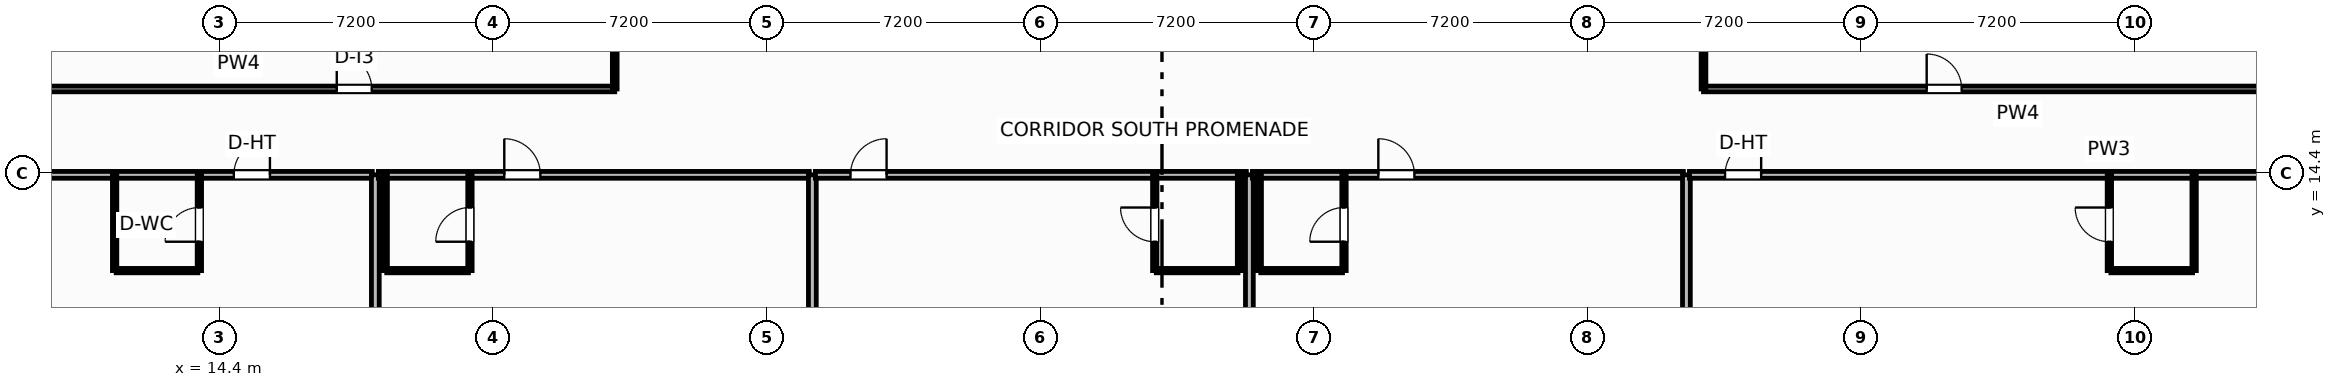
"""IFC4 building model, lengths in metres.
Left out: names, types, materials, properties, quantities, classifications, styles, units other than length and angle.
Written with IfcOpenShell. Run it as: python <this file> out.ifc"""

import sys

from ifc_helpers import new_model, si_unit, direction, frame, frame_2d, origin, place, context, subcontext, project, spatial, rectangle, extrude, element, fill, save


model = new_model("IFC4")
c1 = context("Model", 3, precision=1e-05, world=origin(), true_north=direction((0.0, 1.0)))
c2 = subcontext(c1, "Body", "Model", "MODEL_VIEW")
j1 = project(units=[si_unit("LENGTHUNIT", "METRE"), si_unit("PLANEANGLEUNIT", "RADIAN")], contexts=[c1])
p1 = place(None, origin())
s1 = spatial("IfcSite", under=j1, at=p1, CompositionType="ELEMENT")
p2 = place(p1, origin())
s2 = spatial("IfcBuilding", under=s1, at=p2, CompositionType="ELEMENT")
p3 = place(p2, frame((0.0, 0.0, 132.8)))
s3 = spatial("IfcBuildingStorey", under=s2, at=p3, CompositionType="ELEMENT", Elevation=132.8)
p4 = place(p3, frame((5.0, 16.61, 0.0), z_axis=(0.0, 0.0, 1.0), x_axis=(1.0, 0.0, 0.0)))
e1 = element("IfcWall", 1, at=p4, inside=s3, PredefinedType="PARTITIONING", context=c2, shape_type="SweptSolid", body=[
    extrude(rectangle(XDim=19.8, YDim=0.15, at=frame_2d((9.9, 0.0))), origin(), (0.0, 0.0, 1.0), 3.45),
])
p5 = place(p4, frame((12.485, 0.0, 0.0)))
e2 = element("IfcOpeningElement", 2, at=p5, cuts=e1, PredefinedType="OPENING", context=c2, shape_type="SweptSolid", body=[
    extrude(rectangle(XDim=0.92, YDim=2.05, at=frame_2d((0.46, 1.025))), frame((0.0, 0.085, 0.0), z_axis=(0.0, -1.0, 0.0), x_axis=(1.0, 0.0, 0.0)), (0.0, 0.0, 1.0), 0.17),
])
p6 = place(p3, frame((24.8, 16.61, 0.0), z_axis=(0.0, 0.0, 1.0), x_axis=(0.0, 1.0, 0.0)))
e3 = element("IfcWall", 3, at=p6, inside=s3, PredefinedType="PARTITIONING", context=c2, shape_type="SweptSolid", body=[
    extrude(rectangle(XDim=2.63, YDim=0.125, at=frame_2d((1.315, 0.0))), origin(), (0.0, 0.0, 1.0), 2.662),
])
p7 = place(p3, frame((53.45, 16.61, 0.0), z_axis=(0.0, 0.0, 1.0), x_axis=(1.0, 0.0, 0.0)))
e4 = element("IfcWall", 4, at=p7, inside=s3, PredefinedType="PARTITIONING", context=c2, shape_type="SweptSolid", body=[
    extrude(rectangle(XDim=16.55, YDim=0.15, at=frame_2d((8.275, 0.0))), origin(), (0.0, 0.0, 1.0), 3.45),
])
p8 = place(p7, frame((5.873, 0.0, 0.0)))
e5 = element("IfcOpeningElement", 5, at=p8, cuts=e4, PredefinedType="OPENING", context=c2, shape_type="SweptSolid", body=[
    extrude(rectangle(XDim=0.92, YDim=2.05, at=frame_2d((0.46, 1.025))), frame((0.0, 0.085, 0.0), z_axis=(0.0, -1.0, 0.0), x_axis=(1.0, 0.0, 0.0)), (0.0, 0.0, 1.0), 0.17),
])
p9 = place(p3, frame((53.45, 16.61, 0.0), z_axis=(0.0, 0.0, 1.0), x_axis=(0.0, 1.0, 0.0)))
e6 = element("IfcWall", 6, at=p9, inside=s3, PredefinedType="PARTITIONING", context=c2, shape_type="SweptSolid", body=[
    extrude(rectangle(XDim=2.63, YDim=0.125, at=frame_2d((1.315, 0.0))), origin(), (0.0, 0.0, 1.0), 3.45),
])
p10 = place(p3, frame((0.581, 14.35, 0.0), z_axis=(0.0, 0.0, 1.0), x_axis=(1.0, 0.0, 0.0)))
e7 = element("IfcWall", 7, at=p10, inside=s3, PredefinedType="PARTITIONING", context=c2, shape_type="SweptSolid", body=[
    extrude(rectangle(XDim=17.839, YDim=0.18, at=frame_2d((8.919, 0.0))), origin(), (0.0, 0.0, 1.0), 3.45),
])
p11 = place(p10, frame((14.196, 0.0, 0.0)))
e8 = element("IfcOpeningElement", 8, at=p11, cuts=e7, PredefinedType="OPENING", context=c2, shape_type="SweptSolid", body=[
    extrude(rectangle(XDim=0.95, YDim=2.15, at=frame_2d((0.475, 1.075))), frame((0.0, 0.1, 0.0), z_axis=(0.0, -1.0, 0.0), x_axis=(1.0, 0.0, 0.0)), (0.0, 0.0, 1.0), 0.2),
])
p12 = place(p3, frame((11.68, 11.83, 0.0), z_axis=(0.0, 0.0, 1.0), x_axis=(1.0, 0.0, 0.0)))
e9 = element("IfcWall", 9, at=p12, inside=s3, PredefinedType="PARTITIONING", context=c2, shape_type="SweptSolid", body=[
    extrude(rectangle(XDim=2.15, YDim=0.115, at=frame_2d((1.075, 0.0))), origin(), (0.0, 0.0, 1.0), 3.45),
])
p13 = place(p3, frame((13.87, 11.83, 0.0), z_axis=(0.0, 0.0, 1.0), x_axis=(0.0, 1.0, 0.0)))
e10 = element("IfcWall", 10, at=p13, inside=s3, PredefinedType="PARTITIONING", context=c2, shape_type="SweptSolid", body=[
    extrude(rectangle(XDim=2.52, YDim=0.115, at=frame_2d((1.26, 0.0))), origin(), (0.0, 0.0, 1.0), 3.45),
])
p14 = place(p13, frame((0.76, 0.0, 0.0)))
e11 = element("IfcOpeningElement", 11, at=p14, cuts=e10, PredefinedType="OPENING", context=c2, shape_type="SweptSolid", body=[
    extrude(rectangle(XDim=0.9, YDim=2.05, at=frame_2d((0.45, 1.025))), frame((0.0, 0.067, 0.0), z_axis=(0.0, -1.0, 0.0), x_axis=(1.0, 0.0, 0.0)), (0.0, 0.0, 1.0), 0.135),
])
p15 = place(p3, frame((11.64, 11.83, 0.0), z_axis=(0.0, 0.0, 1.0), x_axis=(0.0, 1.0, 0.0)))
e12 = element("IfcWall", 12, at=p15, inside=s3, PredefinedType="PARTITIONING", context=c2, shape_type="SweptSolid", body=[
    extrude(rectangle(XDim=2.52, YDim=0.115, at=frame_2d((1.26, 0.0))), origin(), (0.0, 0.0, 1.0), 3.45),
])
p16 = place(p3, frame((18.5, 4.379, 0.0), z_axis=(0.0, 0.0, 1.0), x_axis=(0.0, 1.0, 0.0)))
e13 = element("IfcWall", 13, at=p16, inside=s3, PredefinedType="PARTITIONING", context=c2, shape_type="SweptSolid", body=[
    extrude(rectangle(XDim=9.971, YDim=0.205, at=frame_2d((4.985, 0.0))), origin(), (0.0, 0.0, 1.0), 3.45),
])
p17 = place(p3, frame((18.58, 14.35, 0.0), z_axis=(0.0, 0.0, 1.0), x_axis=(1.0, 0.0, 0.0)))
e14 = element("IfcWall", 14, at=p17, inside=s3, PredefinedType="PARTITIONING", context=c2, shape_type="SweptSolid", body=[
    extrude(rectangle(XDim=11.34, YDim=0.18, at=frame_2d((5.67, 0.0))), origin(), (0.0, 0.0, 1.0), 3.45),
])
p18 = place(p17, frame((3.313, 0.0, 0.0)))
e15 = element("IfcOpeningElement", 15, at=p18, cuts=e14, PredefinedType="OPENING", context=c2, shape_type="SweptSolid", body=[
    extrude(rectangle(XDim=0.95, YDim=2.15, at=frame_2d((0.475, 1.075))), frame((0.0, 0.1, 0.0), z_axis=(0.0, -1.0, 0.0), x_axis=(1.0, 0.0, 0.0)), (0.0, 0.0, 1.0), 0.2),
])
p19 = place(p3, frame((18.8, 11.83, 0.0), z_axis=(0.0, 0.0, 1.0), x_axis=(1.0, 0.0, 0.0)))
e16 = element("IfcWall", 16, at=p19, inside=s3, PredefinedType="PARTITIONING", context=c2, shape_type="SweptSolid", body=[
    extrude(rectangle(XDim=2.15, YDim=0.115, at=frame_2d((1.075, 0.0))), origin(), (0.0, 0.0, 1.0), 3.45),
])
p20 = place(p3, frame((20.99, 11.83, 0.0), z_axis=(0.0, 0.0, 1.0), x_axis=(0.0, 1.0, 0.0)))
e17 = element("IfcWall", 17, at=p20, inside=s3, PredefinedType="PARTITIONING", context=c2, shape_type="SweptSolid", body=[
    extrude(rectangle(XDim=2.52, YDim=0.115, at=frame_2d((1.26, 0.0))), origin(), (0.0, 0.0, 1.0), 3.45),
])
p21 = place(p20, frame((0.76, 0.0, 0.0)))
e18 = element("IfcOpeningElement", 18, at=p21, cuts=e17, PredefinedType="OPENING", context=c2, shape_type="SweptSolid", body=[
    extrude(rectangle(XDim=0.9, YDim=2.05, at=frame_2d((0.45, 1.025))), frame((0.0, 0.067, 0.0), z_axis=(0.0, -1.0, 0.0), x_axis=(1.0, 0.0, 0.0)), (0.0, 0.0, 1.0), 0.135),
])
p22 = place(p3, frame((18.76, 11.83, 0.0), z_axis=(0.0, 0.0, 1.0), x_axis=(0.0, 1.0, 0.0)))
e19 = element("IfcWall", 19, at=p22, inside=s3, PredefinedType="PARTITIONING", context=c2, shape_type="SweptSolid", body=[
    extrude(rectangle(XDim=2.52, YDim=0.115, at=frame_2d((1.26, 0.0))), origin(), (0.0, 0.0, 1.0), 3.45),
])
p23 = place(p3, frame((30.0, 5.1, 0.0), z_axis=(0.0, 0.0, 1.0), x_axis=(0.0, 1.0, 0.0)))
e20 = element("IfcWall", 20, at=p23, inside=s3, PredefinedType="PARTITIONING", context=c2, shape_type="SweptSolid", body=[
    extrude(rectangle(XDim=9.25, YDim=0.205, at=frame_2d((4.625, 0.0))), origin(), (0.0, 0.0, 1.0), 3.45),
])
p24 = place(p3, frame((30.08, 14.35, 0.0), z_axis=(0.0, 0.0, 1.0), x_axis=(1.0, 0.0, 0.0)))
e21 = element("IfcWall", 21, at=p24, inside=s3, PredefinedType="PARTITIONING", context=c2, shape_type="SweptSolid", body=[
    extrude(rectangle(XDim=11.34, YDim=0.18, at=frame_2d((5.67, 0.0))), origin(), (0.0, 0.0, 1.0), 3.45),
])
p25 = place(p24, frame((0.923, 0.0, 0.0)))
e22 = element("IfcOpeningElement", 22, at=p25, cuts=e21, PredefinedType="OPENING", context=c2, shape_type="SweptSolid", body=[
    extrude(rectangle(XDim=0.95, YDim=2.15, at=frame_2d((0.475, 1.075))), frame((0.0, 0.1, 0.0), z_axis=(0.0, -1.0, 0.0), x_axis=(1.0, 0.0, 0.0)), (0.0, 0.0, 1.0), 0.2),
])
p26 = place(p3, frame((39.05, 11.83, 0.0), z_axis=(0.0, 0.0, 1.0), x_axis=(1.0, 0.0, 0.0)))
e23 = element("IfcWall", 23, at=p26, inside=s3, PredefinedType="PARTITIONING", context=c2, shape_type="SweptSolid", body=[
    extrude(rectangle(XDim=2.15, YDim=0.115, at=frame_2d((1.075, 0.0))), origin(), (0.0, 0.0, 1.0), 3.45),
])
p27 = place(p3, frame((39.01, 11.83, 0.0), z_axis=(0.0, 0.0, 1.0), x_axis=(0.0, 1.0, 0.0)))
e24 = element("IfcWall", 24, at=p27, inside=s3, PredefinedType="PARTITIONING", context=c2, shape_type="SweptSolid", body=[
    extrude(rectangle(XDim=2.52, YDim=0.115, at=frame_2d((1.26, 0.0))), origin(), (0.0, 0.0, 1.0), 3.45),
])
p28 = place(p27, frame((0.76, 0.0, 0.0)))
e25 = element("IfcOpeningElement", 25, at=p28, cuts=e24, PredefinedType="OPENING", context=c2, shape_type="SweptSolid", body=[
    extrude(rectangle(XDim=0.9, YDim=2.05, at=frame_2d((0.45, 1.025))), frame((0.0, 0.067, 0.0), z_axis=(0.0, -1.0, 0.0), x_axis=(1.0, 0.0, 0.0)), (0.0, 0.0, 1.0), 0.135),
])
p29 = place(p3, frame((41.24, 11.83, 0.0), z_axis=(0.0, 0.0, 1.0), x_axis=(0.0, 1.0, 0.0)))
e26 = element("IfcWall", 26, at=p29, inside=s3, PredefinedType="PARTITIONING", context=c2, shape_type="SweptSolid", body=[
    extrude(rectangle(XDim=2.52, YDim=0.115, at=frame_2d((1.26, 0.0))), origin(), (0.0, 0.0, 1.0), 3.45),
])
p30 = place(p3, frame((41.5, 3.706, 0.0), z_axis=(0.0, 0.0, 1.0), x_axis=(0.0, 1.0, 0.0)))
e27 = element("IfcWall", 27, at=p30, inside=s3, PredefinedType="PARTITIONING", context=c2, shape_type="SweptSolid", body=[
    extrude(rectangle(XDim=10.644, YDim=0.205, at=frame_2d((5.322, 0.0))), origin(), (0.0, 0.0, 1.0), 3.45),
])
p31 = place(p3, frame((41.58, 14.35, 0.0), z_axis=(0.0, 0.0, 1.0), x_axis=(1.0, 0.0, 0.0)))
e28 = element("IfcWall", 28, at=p31, inside=s3, PredefinedType="PARTITIONING", context=c2, shape_type="SweptSolid", body=[
    extrude(rectangle(XDim=11.34, YDim=0.18, at=frame_2d((5.67, 0.0))), origin(), (0.0, 0.0, 1.0), 3.45),
])
p32 = place(p31, frame((3.313, 0.0, 0.0)))
e29 = element("IfcOpeningElement", 29, at=p32, cuts=e28, PredefinedType="OPENING", context=c2, shape_type="SweptSolid", body=[
    extrude(rectangle(XDim=0.95, YDim=2.15, at=frame_2d((0.475, 1.075))), frame((0.0, 0.1, 0.0), z_axis=(0.0, -1.0, 0.0), x_axis=(1.0, 0.0, 0.0)), (0.0, 0.0, 1.0), 0.2),
])
p33 = place(p3, frame((41.8, 11.83, 0.0), z_axis=(0.0, 0.0, 1.0), x_axis=(1.0, 0.0, 0.0)))
e30 = element("IfcWall", 30, at=p33, inside=s3, PredefinedType="PARTITIONING", context=c2, shape_type="SweptSolid", body=[
    extrude(rectangle(XDim=2.15, YDim=0.115, at=frame_2d((1.075, 0.0))), origin(), (0.0, 0.0, 1.0), 3.45),
])
p34 = place(p3, frame((43.99, 11.83, 0.0), z_axis=(0.0, 0.0, 1.0), x_axis=(0.0, 1.0, 0.0)))
e31 = element("IfcWall", 31, at=p34, inside=s3, PredefinedType="PARTITIONING", context=c2, shape_type="SweptSolid", body=[
    extrude(rectangle(XDim=2.52, YDim=0.115, at=frame_2d((1.26, 0.0))), origin(), (0.0, 0.0, 1.0), 3.45),
])
p35 = place(p34, frame((0.76, 0.0, 0.0)))
e32 = element("IfcOpeningElement", 32, at=p35, cuts=e31, PredefinedType="OPENING", context=c2, shape_type="SweptSolid", body=[
    extrude(rectangle(XDim=0.9, YDim=2.05, at=frame_2d((0.45, 1.025))), frame((0.0, 0.067, 0.0), z_axis=(0.0, -1.0, 0.0), x_axis=(1.0, 0.0, 0.0)), (0.0, 0.0, 1.0), 0.135),
])
p36 = place(p3, frame((41.76, 11.83, 0.0), z_axis=(0.0, 0.0, 1.0), x_axis=(0.0, 1.0, 0.0)))
e33 = element("IfcWall", 33, at=p36, inside=s3, PredefinedType="PARTITIONING", context=c2, shape_type="SweptSolid", body=[
    extrude(rectangle(XDim=2.52, YDim=0.115, at=frame_2d((1.26, 0.0))), origin(), (0.0, 0.0, 1.0), 3.45),
])
p37 = place(p3, frame((53.0, 0.197, 0.0), z_axis=(0.0, 0.0, 1.0), x_axis=(0.0, 1.0, 0.0)))
e34 = element("IfcWall", 34, at=p37, inside=s3, PredefinedType="PARTITIONING", context=c2, shape_type="SweptSolid", body=[
    extrude(rectangle(XDim=14.153, YDim=0.205, at=frame_2d((7.077, 0.0))), origin(), (0.0, 0.0, 1.0), 3.45),
])
p38 = place(p3, frame((53.08, 14.35, 0.0), z_axis=(0.0, 0.0, 1.0), x_axis=(1.0, 0.0, 0.0)))
e35 = element("IfcWall", 35, at=p38, inside=s3, PredefinedType="PARTITIONING", context=c2, shape_type="SweptSolid", body=[
    extrude(rectangle(XDim=22.084, YDim=0.18, at=frame_2d((11.042, 0.0))), origin(), (0.0, 0.0, 1.0), 3.45),
])
p39 = place(p38, frame((0.937, 0.0, 0.0)))
e36 = element("IfcOpeningElement", 36, at=p39, cuts=e35, PredefinedType="OPENING", context=c2, shape_type="SweptSolid", body=[
    extrude(rectangle(XDim=0.95, YDim=2.15, at=frame_2d((0.475, 1.075))), frame((0.0, 0.1, 0.0), z_axis=(0.0, -1.0, 0.0), x_axis=(1.0, 0.0, 0.0)), (0.0, 0.0, 1.0), 0.2),
])
p40 = place(p3, frame((64.17, 11.83, 0.0), z_axis=(0.0, 0.0, 1.0), x_axis=(1.0, 0.0, 0.0)))
e37 = element("IfcWall", 37, at=p40, inside=s3, PredefinedType="PARTITIONING", context=c2, shape_type="SweptSolid", body=[
    extrude(rectangle(XDim=2.15, YDim=0.115, at=frame_2d((1.075, 0.0))), origin(), (0.0, 0.0, 1.0), 3.45),
])
p41 = place(p3, frame((64.13, 11.83, 0.0), z_axis=(0.0, 0.0, 1.0), x_axis=(0.0, 1.0, 0.0)))
e38 = element("IfcWall", 38, at=p41, inside=s3, PredefinedType="PARTITIONING", context=c2, shape_type="SweptSolid", body=[
    extrude(rectangle(XDim=2.52, YDim=0.115, at=frame_2d((1.26, 0.0))), origin(), (0.0, 0.0, 1.0), 3.45),
])
p42 = place(p41, frame((0.76, 0.0, 0.0)))
e39 = element("IfcOpeningElement", 39, at=p42, cuts=e38, PredefinedType="OPENING", context=c2, shape_type="SweptSolid", body=[
    extrude(rectangle(XDim=0.9, YDim=2.05, at=frame_2d((0.45, 1.025))), frame((0.0, 0.067, 0.0), z_axis=(0.0, -1.0, 0.0), x_axis=(1.0, 0.0, 0.0)), (0.0, 0.0, 1.0), 0.135),
])
p43 = place(p3, frame((66.36, 11.83, 0.0), z_axis=(0.0, 0.0, 1.0), x_axis=(0.0, 1.0, 0.0)))
e40 = element("IfcWall", 40, at=p43, inside=s3, PredefinedType="PARTITIONING", context=c2, shape_type="SweptSolid", body=[
    extrude(rectangle(XDim=2.52, YDim=0.115, at=frame_2d((1.26, 0.0))), origin(), (0.0, 0.0, 1.0), 3.45),
])
p44 = place(p5, origin())
e41 = element("IfcDoor", 41, at=p44, inside=s3, OperationType="SINGLE_SWING_LEFT", PredefinedType="DOOR", context=c2, shape_type="SweptSolid", body=[
    extrude(rectangle(XDim=0.92, YDim=2.05, at=frame_2d((0.46, 1.025))), frame((0.0, 0.025, 0.0), z_axis=(0.0, -1.0, 0.0), x_axis=(1.0, 0.0, 0.0)), (0.0, 0.0, 1.0), 0.05),
])
fill(e2, e41)
p45 = place(p8, origin())
e42 = element("IfcDoor", 42, at=p45, inside=s3, OperationType="SINGLE_SWING_LEFT", PredefinedType="DOOR", context=c2, shape_type="SweptSolid", body=[
    extrude(rectangle(XDim=0.92, YDim=2.05, at=frame_2d((0.46, 1.025))), frame((0.0, 0.025, 0.0), z_axis=(0.0, -1.0, 0.0), x_axis=(1.0, 0.0, 0.0)), (0.0, 0.0, 1.0), 0.05),
])
fill(e5, e42)
p46 = place(p11, origin())
e43 = element("IfcDoor", 43, at=p46, inside=s3, OperationType="SINGLE_SWING_RIGHT", PredefinedType="DOOR", context=c2, shape_type="SweptSolid", body=[
    extrude(rectangle(XDim=0.95, YDim=2.15, at=frame_2d((0.475, 1.075))), frame((0.0, 0.025, 0.0), z_axis=(0.0, -1.0, 0.0), x_axis=(1.0, 0.0, 0.0)), (0.0, 0.0, 1.0), 0.05),
])
fill(e8, e43)
p47 = place(p14, origin())
e44 = element("IfcDoor", 44, at=p47, inside=s3, OperationType="SINGLE_SWING_LEFT", PredefinedType="DOOR", context=c2, shape_type="SweptSolid", body=[
    extrude(rectangle(XDim=0.9, YDim=2.05, at=frame_2d((0.45, 1.025))), frame((0.0, 0.025, 0.0), z_axis=(0.0, -1.0, 0.0), x_axis=(1.0, 0.0, 0.0)), (0.0, 0.0, 1.0), 0.05),
])
fill(e11, e44)
p48 = place(p18, origin())
e45 = element("IfcDoor", 45, at=p48, inside=s3, OperationType="SINGLE_SWING_LEFT", PredefinedType="DOOR", context=c2, shape_type="SweptSolid", body=[
    extrude(rectangle(XDim=0.95, YDim=2.15, at=frame_2d((0.475, 1.075))), frame((0.0, 0.025, 0.0), z_axis=(0.0, -1.0, 0.0), x_axis=(1.0, 0.0, 0.0)), (0.0, 0.0, 1.0), 0.05),
])
fill(e15, e45)
p49 = place(p21, origin())
e46 = element("IfcDoor", 46, at=p49, inside=s3, OperationType="SINGLE_SWING_LEFT", PredefinedType="DOOR", context=c2, shape_type="SweptSolid", body=[
    extrude(rectangle(XDim=0.9, YDim=2.05, at=frame_2d((0.45, 1.025))), frame((0.0, 0.025, 0.0), z_axis=(0.0, -1.0, 0.0), x_axis=(1.0, 0.0, 0.0)), (0.0, 0.0, 1.0), 0.05),
])
fill(e18, e46)
p50 = place(p25, origin())
e47 = element("IfcDoor", 47, at=p50, inside=s3, OperationType="SINGLE_SWING_RIGHT", PredefinedType="DOOR", context=c2, shape_type="SweptSolid", body=[
    extrude(rectangle(XDim=0.95, YDim=2.15, at=frame_2d((0.475, 1.075))), frame((0.0, 0.025, 0.0), z_axis=(0.0, -1.0, 0.0), x_axis=(1.0, 0.0, 0.0)), (0.0, 0.0, 1.0), 0.05),
])
fill(e22, e47)
p51 = place(p28, origin())
e48 = element("IfcDoor", 48, at=p51, inside=s3, OperationType="SINGLE_SWING_RIGHT", PredefinedType="DOOR", context=c2, shape_type="SweptSolid", body=[
    extrude(rectangle(XDim=0.9, YDim=2.05, at=frame_2d((0.45, 1.025))), frame((0.0, 0.025, 0.0), z_axis=(0.0, -1.0, 0.0), x_axis=(1.0, 0.0, 0.0)), (0.0, 0.0, 1.0), 0.05),
])
fill(e25, e48)
p52 = place(p32, origin())
e49 = element("IfcDoor", 49, at=p52, inside=s3, OperationType="SINGLE_SWING_LEFT", PredefinedType="DOOR", context=c2, shape_type="SweptSolid", body=[
    extrude(rectangle(XDim=0.95, YDim=2.15, at=frame_2d((0.475, 1.075))), frame((0.0, 0.025, 0.0), z_axis=(0.0, -1.0, 0.0), x_axis=(1.0, 0.0, 0.0)), (0.0, 0.0, 1.0), 0.05),
])
fill(e29, e49)
p53 = place(p35, origin())
e50 = element("IfcDoor", 50, at=p53, inside=s3, OperationType="SINGLE_SWING_LEFT", PredefinedType="DOOR", context=c2, shape_type="SweptSolid", body=[
    extrude(rectangle(XDim=0.9, YDim=2.05, at=frame_2d((0.45, 1.025))), frame((0.0, 0.025, 0.0), z_axis=(0.0, -1.0, 0.0), x_axis=(1.0, 0.0, 0.0)), (0.0, 0.0, 1.0), 0.05),
])
fill(e32, e50)
p54 = place(p39, origin())
e51 = element("IfcDoor", 51, at=p54, inside=s3, OperationType="SINGLE_SWING_RIGHT", PredefinedType="DOOR", context=c2, shape_type="SweptSolid", body=[
    extrude(rectangle(XDim=0.95, YDim=2.15, at=frame_2d((0.475, 1.075))), frame((0.0, 0.025, 0.0), z_axis=(0.0, -1.0, 0.0), x_axis=(1.0, 0.0, 0.0)), (0.0, 0.0, 1.0), 0.05),
])
fill(e36, e51)
p55 = place(p42, origin())
e52 = element("IfcDoor", 52, at=p55, inside=s3, OperationType="SINGLE_SWING_RIGHT", PredefinedType="DOOR", context=c2, shape_type="SweptSolid", body=[
    extrude(rectangle(XDim=0.9, YDim=2.05, at=frame_2d((0.45, 1.025))), frame((0.0, 0.025, 0.0), z_axis=(0.0, -1.0, 0.0), x_axis=(1.0, 0.0, 0.0)), (0.0, 0.0, 1.0), 0.05),
])
fill(e39, e52)
save(model, sys.argv[1])
